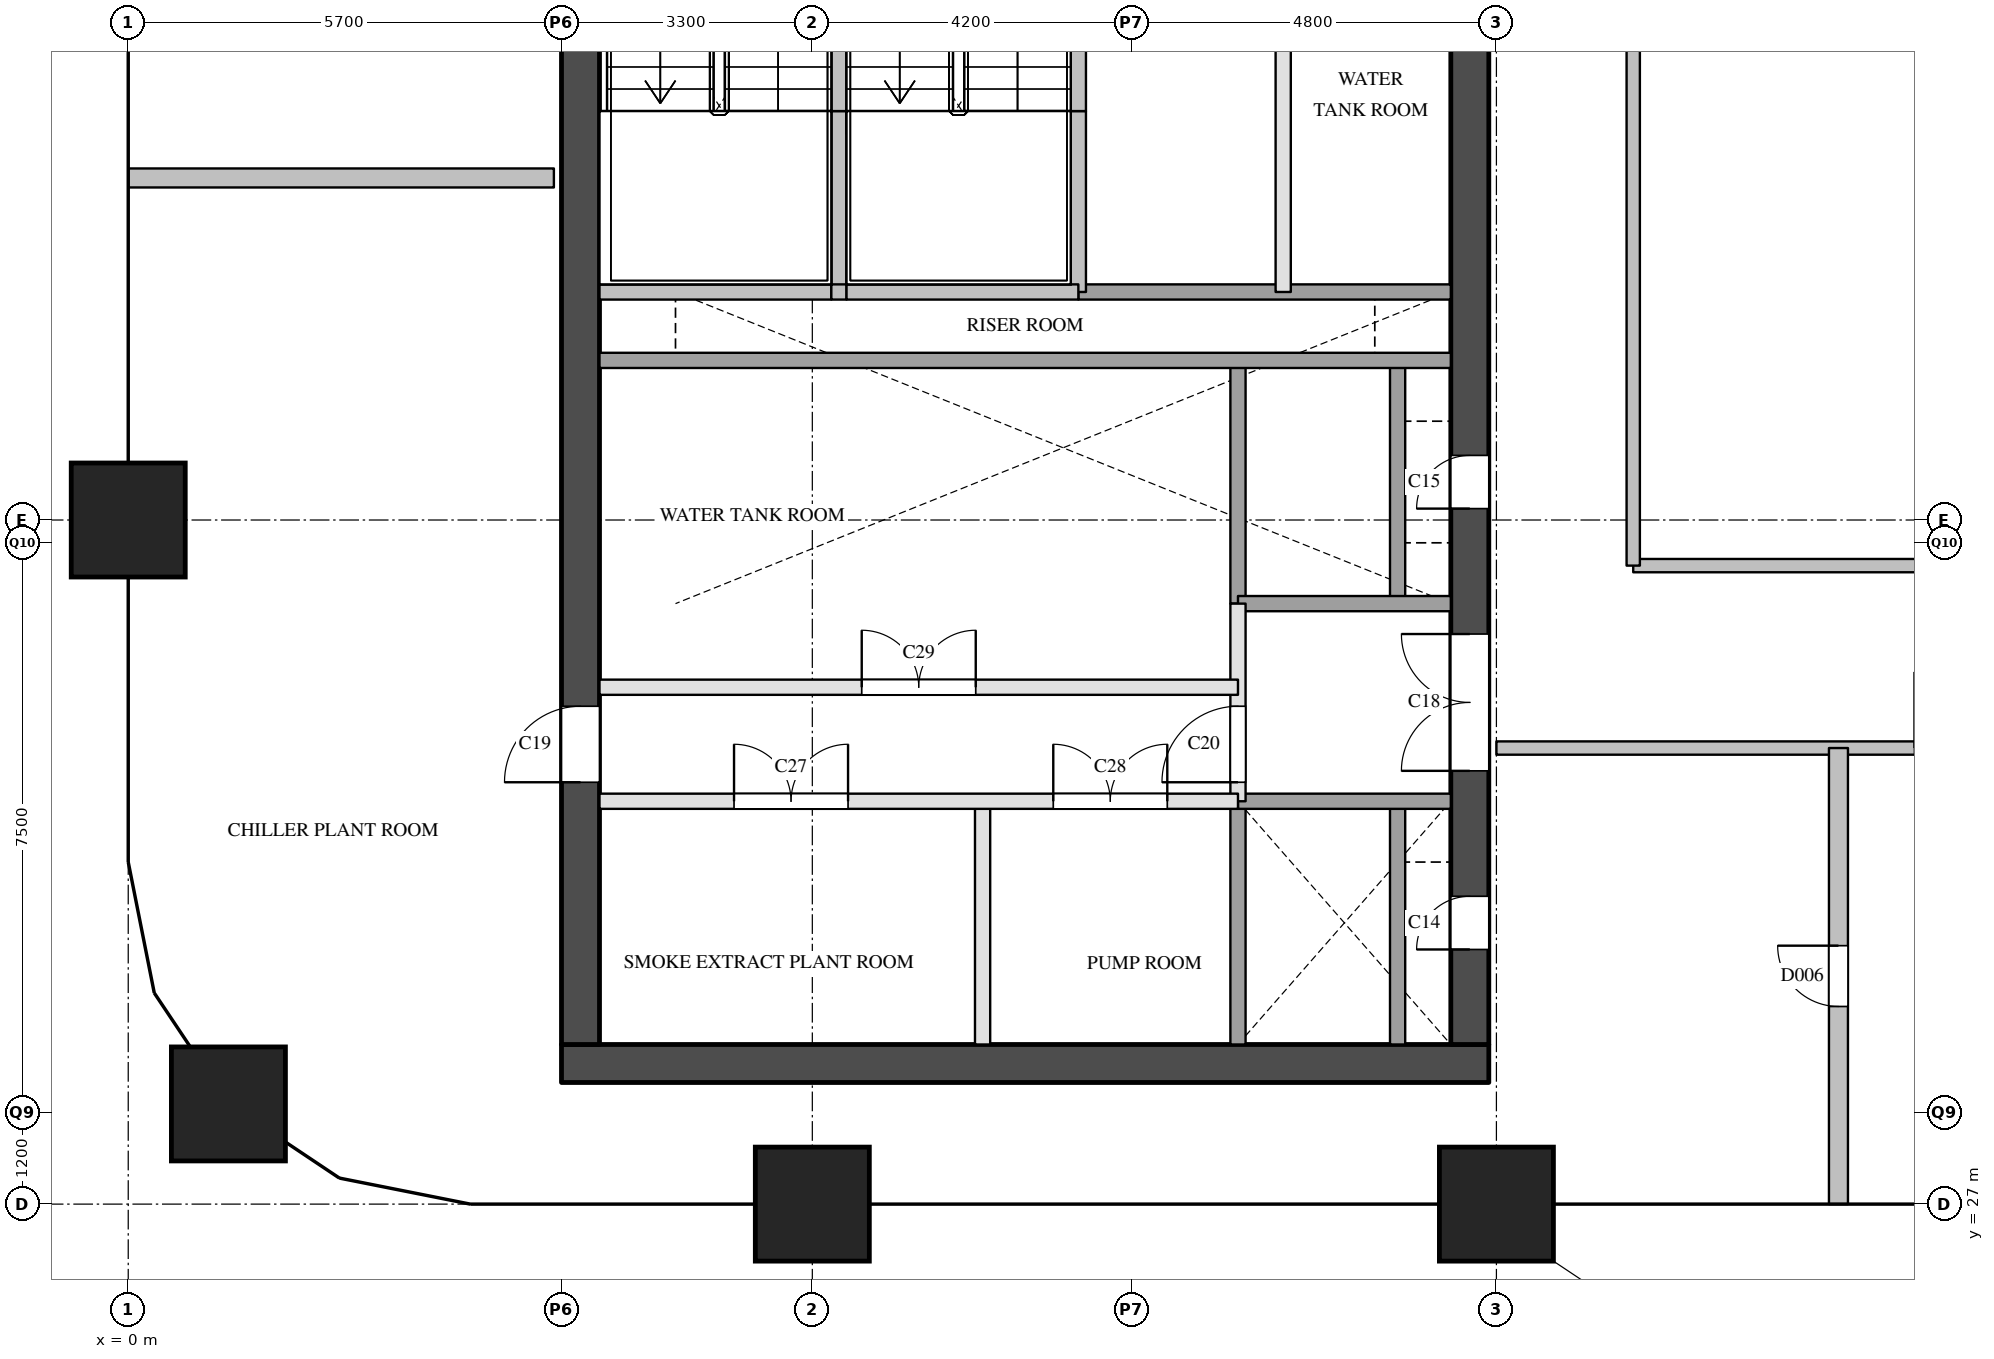
"""IFC4 building model, lengths in metres.
Left out: names, types, materials, properties, quantities, classifications, styles, units other than length and angle.
Written with IfcOpenShell. Run it as: python <this file> out.ifc"""

import sys

from ifc_helpers import new_model, si_unit, direction, frame, frame_2d, origin, origin_2d, place, context, subcontext, project, spatial, rectangle, extrude, element, fill, save


model = new_model("IFC4")
c1 = context("Model", 3, precision=1e-05, world=origin(), true_north=direction((0.0, 1.0)))
c2 = subcontext(c1, "Body", "Model", "MODEL_VIEW")
j1 = project(units=[si_unit("LENGTHUNIT", "METRE"), si_unit("PLANEANGLEUNIT", "RADIAN")], contexts=[c1])
p1 = place(None, origin())
s1 = spatial("IfcSite", under=j1, at=p1, CompositionType="ELEMENT")
p2 = place(p1, origin())
s2 = spatial("IfcBuilding", under=s1, at=p2, CompositionType="ELEMENT")
p3 = place(p2, frame((0.0, 0.0, 197.3)))
s3 = spatial("IfcBuildingStorey", under=s2, at=p3, CompositionType="ELEMENT", Elevation=197.3)
for number, where, z_axis, x_axis in (
    (1, (1.318, 28.318, 0.0), (0.0, 0.0, 1.0), (1.0, 0.0, 0.0)),
    (2, (0.0, 36.0, 0.0), (0.0, 0.0, 1.0), (1.0, 0.0, 0.0)),
    (3, (9.0, 27.0, 0.0), (0.0, 0.0, 1.0), (1.0, 0.0, 0.0)),
    (4, (18.0, 27.0, 0.0), (0.0, 0.0, 1.0), (1.0, 0.0, 0.0)),
):
    element("IfcColumn", number, at=place(p3, frame(where, z_axis=z_axis, x_axis=x_axis)), inside=s3, PredefinedType="COLUMN", context=c2, shape_type="SweptSolid", body=[
        extrude(rectangle(XDim=1.5, YDim=1.5, at=origin_2d()), origin(), (0.0, 0.0, 1.0), 6.0),
    ])
p4 = place(p3, frame((5.7, 28.85, 0.0), z_axis=(0.0, 0.0, 1.0), x_axis=(1.0, 0.0, 0.0)))
e5 = element("IfcWall", 5, at=p4, inside=s3, PredefinedType="SHEAR", context=c2, shape_type="SweptSolid", body=[
    extrude(rectangle(XDim=12.2, YDim=0.5, at=frame_2d((6.1, 0.0))), origin(), (0.0, 0.0, 1.0), 5.7),
])
p5 = place(p3, frame((5.95, 29.1, 0.0), z_axis=(0.0, 0.0, 1.0), x_axis=(0.0, 1.0, 0.0)))
e6 = element("IfcWall", 6, at=p5, inside=s3, PredefinedType="SHEAR", context=c2, shape_type="SweptSolid", body=[
    extrude(rectangle(XDim=20.3, YDim=0.5, at=frame_2d((10.15, 0.0))), origin(), (0.0, 0.0, 1.0), 5.7),
])
p6 = place(p5, frame((3.45, 0.0, 0.0)))
e7 = element("IfcOpeningElement", 7, at=p6, cuts=e6, PredefinedType="OPENING", context=c2, shape_type="SweptSolid", body=[
    extrude(rectangle(XDim=1.0, YDim=2.1, at=frame_2d((0.5, 1.05))), frame((0.0, 0.26, 0.0), z_axis=(0.0, -1.0, 0.0), x_axis=(1.0, 0.0, 0.0)), (0.0, 0.0, 1.0), 0.52),
])
p7 = place(p3, frame((17.65, 29.1, 0.0), z_axis=(0.0, 0.0, 1.0), x_axis=(0.0, 1.0, 0.0)))
e8 = element("IfcWall", 8, at=p7, inside=s3, PredefinedType="SHEAR", context=c2, shape_type="SweptSolid", body=[
    extrude(rectangle(XDim=20.3, YDim=0.5, at=frame_2d((10.15, 0.0))), origin(), (0.0, 0.0, 1.0), 5.7),
])
p8 = place(p7, frame((1.25, 0.0, 0.0)))
e9 = element("IfcOpeningElement", 9, at=p8, cuts=e8, PredefinedType="OPENING", context=c2, shape_type="SweptSolid", body=[
    extrude(rectangle(XDim=0.7, YDim=2.1, at=frame_2d((0.35, 1.05))), frame((0.0, 0.26, 0.0), z_axis=(0.0, -1.0, 0.0), x_axis=(1.0, 0.0, 0.0)), (0.0, 0.0, 1.0), 0.52),
])
p9 = place(p7, frame((7.05, 0.0, 0.0)))
e10 = element("IfcOpeningElement", 10, at=p9, cuts=e8, PredefinedType="OPENING", context=c2, shape_type="SweptSolid", body=[
    extrude(rectangle(XDim=0.7, YDim=2.1, at=frame_2d((0.35, 1.05))), frame((0.0, 0.26, 0.0), z_axis=(0.0, -1.0, 0.0), x_axis=(1.0, 0.0, 0.0)), (0.0, 0.0, 1.0), 0.52),
])
p10 = place(p7, frame((3.6, 0.0, 0.0)))
e11 = element("IfcOpeningElement", 11, at=p10, cuts=e8, PredefinedType="OPENING", context=c2, shape_type="SweptSolid", body=[
    extrude(rectangle(XDim=1.8, YDim=2.1, at=frame_2d((0.9, 1.05))), frame((0.0, 0.26, 0.0), z_axis=(0.0, -1.0, 0.0), x_axis=(1.0, 0.0, 0.0)), (0.0, 0.0, 1.0), 0.52),
])
p11 = place(p7, frame((16.4, 0.0, 0.0)))
e12 = element("IfcOpeningElement", 12, at=p11, cuts=e8, PredefinedType="OPENING", context=c2, shape_type="SweptSolid", body=[
    extrude(rectangle(XDim=1.0, YDim=2.1, at=frame_2d((0.5, 1.05))), frame((0.0, 0.26, 0.0), z_axis=(0.0, -1.0, 0.0), x_axis=(1.0, 0.0, 0.0)), (0.0, 0.0, 1.0), 0.52),
])
p12 = place(p3, frame((9.35, 39.0, 0.0), z_axis=(0.0, 0.0, 1.0), x_axis=(0.0, 1.0, 0.0)))
e13 = element("IfcWall", 13, at=p12, inside=s3, PredefinedType="SOLIDWALL", context=c2, shape_type="SweptSolid", body=[
    extrude(rectangle(XDim=2.38, YDim=0.2, at=frame_2d((1.19, 0.0))), origin(), (0.0, 0.0, 1.0), 5.7),
])
p13 = place(p3, frame((9.35, 41.38, 0.0), z_axis=(0.0, 0.0, 1.0), x_axis=(0.0, 1.0, 0.0)))
e14 = element("IfcWall", 14, at=p13, inside=s3, PredefinedType="SOLIDWALL", context=c2, shape_type="SweptSolid", body=[
    extrude(rectangle(XDim=2.32, YDim=0.2, at=frame_2d((1.16, 0.0))), origin(), (0.0, 0.0, 1.0), 5.7),
])
p14 = place(p3, frame((11.24, 29.1, 0.0), z_axis=(0.0, 0.0, 1.0), x_axis=(0.0, 1.0, 0.0)))
e15 = element("IfcWall", 15, at=p14, inside=s3, PredefinedType="PARTITIONING", context=c2, shape_type="SweptSolid", body=[
    extrude(rectangle(XDim=3.2, YDim=0.2, at=frame_2d((1.6, 0.0))), origin(), (0.0, 0.0, 1.0), 5.7),
])
p15 = place(p3, frame((12.5, 39.0, 0.0), z_axis=(0.0, 0.0, 1.0), x_axis=(0.0, 1.0, 0.0)))
e16 = element("IfcWall", 16, at=p15, inside=s3, PredefinedType="SOLIDWALL", context=c2, shape_type="SweptSolid", body=[
    extrude(rectangle(XDim=2.38, YDim=0.2, at=frame_2d((1.19, 0.0))), origin(), (0.0, 0.0, 1.0), 5.7),
])
p16 = place(p3, frame((12.5, 41.38, 0.0), z_axis=(0.0, 0.0, 1.0), x_axis=(0.0, 1.0, 0.0)))
e17 = element("IfcWall", 17, at=p16, inside=s3, PredefinedType="SOLIDWALL", context=c2, shape_type="SweptSolid", body=[
    extrude(rectangle(XDim=2.32, YDim=0.2, at=frame_2d((1.16, 0.0))), origin(), (0.0, 0.0, 1.0), 5.7),
])
p17 = place(p3, frame((14.6, 32.3, 0.0), z_axis=(0.0, 0.0, 1.0), x_axis=(0.0, 1.0, 0.0)))
e18 = element("IfcWall", 18, at=p17, inside=s3, PredefinedType="PARTITIONING", context=c2, shape_type="SweptSolid", body=[
    extrude(rectangle(XDim=2.6, YDim=0.2, at=frame_2d((1.3, 0.0))), origin(), (0.0, 0.0, 1.0), 5.7),
])
p18 = place(p17, frame((0.25, 0.0, 0.0)))
e19 = element("IfcOpeningElement", 19, at=p18, cuts=e18, PredefinedType="OPENING", context=c2, shape_type="SweptSolid", body=[
    extrude(rectangle(XDim=1.0, YDim=2.1, at=frame_2d((0.5, 1.05))), frame((0.0, 0.11, 0.0), z_axis=(0.0, -1.0, 0.0), x_axis=(1.0, 0.0, 0.0)), (0.0, 0.0, 1.0), 0.22),
])
p19 = place(p3, frame((14.6, 29.1, 0.0), z_axis=(0.0, 0.0, 1.0), x_axis=(0.0, 1.0, 0.0)))
e20 = element("IfcWall", 20, at=p19, inside=s3, PredefinedType="SOLIDWALL", context=c2, shape_type="SweptSolid", body=[
    extrude(rectangle(XDim=3.2, YDim=0.2, at=frame_2d((1.6, 0.0))), origin(), (0.0, 0.0, 1.0), 5.7),
])
p20 = place(p3, frame((14.6, 34.9, 0.0), z_axis=(0.0, 0.0, 1.0), x_axis=(0.0, 1.0, 0.0)))
e21 = element("IfcWall", 21, at=p20, inside=s3, PredefinedType="SOLIDWALL", context=c2, shape_type="SweptSolid", body=[
    extrude(rectangle(XDim=3.2, YDim=0.2, at=frame_2d((1.6, 0.0))), origin(), (0.0, 0.0, 1.0), 5.7),
])
p21 = place(p3, frame((15.195, 39.0, 0.0), z_axis=(0.0, 0.0, 1.0), x_axis=(0.0, 1.0, 0.0)))
e22 = element("IfcWall", 22, at=p21, inside=s3, PredefinedType="PARTITIONING", context=c2, shape_type="SweptSolid", body=[
    extrude(rectangle(XDim=6.2, YDim=0.2, at=frame_2d((3.1, 0.0))), origin(), (0.0, 0.0, 1.0), 5.7),
])
p22 = place(p3, frame((16.7, 29.1, 0.0), z_axis=(0.0, 0.0, 1.0), x_axis=(0.0, 1.0, 0.0)))
e23 = element("IfcWall", 23, at=p22, inside=s3, PredefinedType="SOLIDWALL", context=c2, shape_type="SweptSolid", body=[
    extrude(rectangle(XDim=3.2, YDim=0.2, at=frame_2d((1.6, 0.0))), origin(), (0.0, 0.0, 1.0), 5.7),
])
p23 = place(p3, frame((16.7, 34.9, 0.0), z_axis=(0.0, 0.0, 1.0), x_axis=(0.0, 1.0, 0.0)))
e24 = element("IfcWall", 24, at=p23, inside=s3, PredefinedType="SOLIDWALL", context=c2, shape_type="SweptSolid", body=[
    extrude(rectangle(XDim=3.2, YDim=0.2, at=frame_2d((1.6, 0.0))), origin(), (0.0, 0.0, 1.0), 5.7),
])
p24 = place(p3, frame((6.2, 32.3, 0.0), z_axis=(0.0, 0.0, 1.0), x_axis=(1.0, 0.0, 0.0)))
e25 = element("IfcWall", 25, at=p24, inside=s3, PredefinedType="PARTITIONING", context=c2, shape_type="SweptSolid", body=[
    extrude(rectangle(XDim=8.4, YDim=0.2, at=frame_2d((4.2, 0.0))), origin(), (0.0, 0.0, 1.0), 5.7),
])
p25 = place(p24, frame((1.77, 0.0, 0.0)))
e26 = element("IfcOpeningElement", 26, at=p25, cuts=e25, PredefinedType="OPENING", context=c2, shape_type="SweptSolid", body=[
    extrude(rectangle(XDim=1.5, YDim=2.1, at=frame_2d((0.75, 1.05))), frame((0.0, 0.11, 0.0), z_axis=(0.0, -1.0, 0.0), x_axis=(1.0, 0.0, 0.0)), (0.0, 0.0, 1.0), 0.22),
])
p26 = place(p24, frame((5.97, 0.0, 0.0)))
e27 = element("IfcOpeningElement", 27, at=p26, cuts=e25, PredefinedType="OPENING", context=c2, shape_type="SweptSolid", body=[
    extrude(rectangle(XDim=1.5, YDim=2.1, at=frame_2d((0.75, 1.05))), frame((0.0, 0.11, 0.0), z_axis=(0.0, -1.0, 0.0), x_axis=(1.0, 0.0, 0.0)), (0.0, 0.0, 1.0), 0.22),
])
p27 = place(p3, frame((14.6, 32.3, 0.0), z_axis=(0.0, 0.0, 1.0), x_axis=(1.0, 0.0, 0.0)))
e28 = element("IfcWall", 28, at=p27, inside=s3, PredefinedType="SOLIDWALL", context=c2, shape_type="SweptSolid", body=[
    extrude(rectangle(XDim=2.8, YDim=0.2, at=frame_2d((1.4, 0.0))), origin(), (0.0, 0.0, 1.0), 5.7),
])
p28 = place(p3, frame((6.2, 33.8, 0.0), z_axis=(0.0, 0.0, 1.0), x_axis=(1.0, 0.0, 0.0)))
e29 = element("IfcWall", 29, at=p28, inside=s3, PredefinedType="PARTITIONING", context=c2, shape_type="SweptSolid", body=[
    extrude(rectangle(XDim=8.4, YDim=0.2, at=frame_2d((4.2, 0.0))), origin(), (0.0, 0.0, 1.0), 5.7),
])
p29 = place(p28, frame((3.45, 0.0, 0.0)))
e30 = element("IfcOpeningElement", 30, at=p29, cuts=e29, PredefinedType="OPENING", context=c2, shape_type="SweptSolid", body=[
    extrude(rectangle(XDim=1.5, YDim=2.1, at=frame_2d((0.75, 1.05))), frame((0.0, 0.11, 0.0), z_axis=(0.0, -1.0, 0.0), x_axis=(1.0, 0.0, 0.0)), (0.0, 0.0, 1.0), 0.22),
])
p30 = place(p3, frame((14.6, 34.9, 0.0), z_axis=(0.0, 0.0, 1.0), x_axis=(1.0, 0.0, 0.0)))
e31 = element("IfcWall", 31, at=p30, inside=s3, PredefinedType="SOLIDWALL", context=c2, shape_type="SweptSolid", body=[
    extrude(rectangle(XDim=2.8, YDim=0.2, at=frame_2d((1.4, 0.0))), origin(), (0.0, 0.0, 1.0), 5.7),
])
p31 = place(p3, frame((6.2, 38.1, 0.0), z_axis=(0.0, 0.0, 1.0), x_axis=(1.0, 0.0, 0.0)))
e32 = element("IfcWall", 32, at=p31, inside=s3, PredefinedType="SOLIDWALL", context=c2, shape_type="SweptSolid", body=[
    extrude(rectangle(XDim=11.2, YDim=0.2, at=frame_2d((5.6, 0.0))), origin(), (0.0, 0.0, 1.0), 5.7),
])
p32 = place(p3, frame((12.5, 39.0, 0.0), z_axis=(0.0, 0.0, 1.0), x_axis=(1.0, 0.0, 0.0)))
e33 = element("IfcWall", 33, at=p32, inside=s3, PredefinedType="SOLIDWALL", context=c2, shape_type="SweptSolid", body=[
    extrude(rectangle(XDim=4.9, YDim=0.2, at=frame_2d((2.45, 0.0))), origin(), (0.0, 0.0, 1.0), 5.7),
])
p33 = place(p3, frame((6.2, 39.0, 0.0), z_axis=(0.0, 0.0, 1.0), x_axis=(1.0, 0.0, 0.0)))
e34 = element("IfcWall", 34, at=p33, inside=s3, PredefinedType="SOLIDWALL", context=c2, shape_type="SweptSolid", body=[
    extrude(rectangle(XDim=3.05, YDim=0.2, at=frame_2d((1.525, 0.0))), origin(), (0.0, 0.0, 1.0), 5.7),
])
p34 = place(p3, frame((9.25, 39.0, 0.0), z_axis=(0.0, 0.0, 1.0), x_axis=(1.0, 0.0, 0.0)))
e35 = element("IfcWall", 35, at=p34, inside=s3, PredefinedType="SOLIDWALL", context=c2, shape_type="SweptSolid", body=[
    extrude(rectangle(XDim=0.2, YDim=0.2, at=frame_2d((0.1, 0.0))), origin(), (0.0, 0.0, 1.0), 5.7),
])
p35 = place(p3, frame((9.45, 39.0, 0.0), z_axis=(0.0, 0.0, 1.0), x_axis=(1.0, 0.0, 0.0)))
e36 = element("IfcWall", 36, at=p35, inside=s3, PredefinedType="SOLIDWALL", context=c2, shape_type="SweptSolid", body=[
    extrude(rectangle(XDim=3.05, YDim=0.2, at=frame_2d((1.525, 0.0))), origin(), (0.0, 0.0, 1.0), 5.7),
])
p36 = place(p3, frame((18.0, 33.0, 0.0), z_axis=(0.0, 0.0, 1.0), x_axis=(1.0, 0.0, 0.0)))
e37 = element("IfcWall", 37, at=p36, inside=s3, PredefinedType="PARTITIONING", context=c2, shape_type="SweptSolid", body=[
    extrude(rectangle(XDim=18.0, YDim=0.175, at=frame_2d((9.0, 0.0))), origin(), (0.0, 0.0, 1.0), 5.7),
])
p37 = place(p36, frame((5.5, 0.0, 0.0)))
e38 = element("IfcOpeningElement", 38, at=p37, cuts=e37, PredefinedType="OPENING", context=c2, shape_type="SweptSolid", body=[
    extrude(rectangle(XDim=1.0, YDim=2.1, at=frame_2d((0.5, 1.05))), frame((0.0, 0.097, 0.0), z_axis=(0.0, -1.0, 0.0), x_axis=(1.0, 0.0, 0.0)), (0.0, 0.0, 1.0), 0.195),
])
p38 = place(p36, frame((11.5, 0.0, 0.0)))
e39 = element("IfcOpeningElement", 39, at=p38, cuts=e37, PredefinedType="OPENING", context=c2, shape_type="SweptSolid", body=[
    extrude(rectangle(XDim=1.0, YDim=2.1, at=frame_2d((0.5, 1.05))), frame((0.0, 0.097, 0.0), z_axis=(0.0, -1.0, 0.0), x_axis=(1.0, 0.0, 0.0)), (0.0, 0.0, 1.0), 0.195),
])
p39 = place(p3, frame((19.8, 35.4, 0.0), z_axis=(0.0, 0.0, 1.0), x_axis=(1.0, 0.0, 0.0)))
e40 = element("IfcWall", 40, at=p39, inside=s3, PredefinedType="PARTITIONING", context=c2, shape_type="SweptSolid", body=[
    extrude(rectangle(XDim=14.4, YDim=0.175, at=frame_2d((7.2, 0.0))), origin(), (0.0, 0.0, 1.0), 5.7),
])
p40 = place(p39, frame((4.12, 0.0, 0.0)))
e41 = element("IfcOpeningElement", 41, at=p40, cuts=e40, PredefinedType="OPENING", context=c2, shape_type="SweptSolid", body=[
    extrude(rectangle(XDim=1.0, YDim=2.1, at=frame_2d((0.5, 1.05))), frame((0.0, 0.097, 0.0), z_axis=(0.0, -1.0, 0.0), x_axis=(1.0, 0.0, 0.0)), (0.0, 0.0, 1.0), 0.195),
])
p41 = place(p3, frame((19.8, 35.4, 0.0), z_axis=(0.0, 0.0, 1.0), x_axis=(0.0, 1.0, 0.0)))
e42 = element("IfcWall", 42, at=p41, inside=s3, PredefinedType="PARTITIONING", context=c2, shape_type="SweptSolid", body=[
    extrude(rectangle(XDim=10.2, YDim=0.175, at=frame_2d((5.1, 0.0))), origin(), (0.0, 0.0, 1.0), 4.59),
])
p42 = place(p3, frame((0.0, 40.5, 0.0), z_axis=(0.0, 0.0, 1.0), x_axis=(1.0, 0.0, 0.0)))
e43 = element("IfcWall", 43, at=p42, inside=s3, PredefinedType="PARTITIONING", context=c2, shape_type="SweptSolid", body=[
    extrude(rectangle(XDim=5.6, YDim=0.25, at=frame_2d((2.8, 0.0))), origin(), (0.0, 0.0, 1.0), 5.7),
])
p43 = place(p3, frame((22.5, 27.0, 0.0), z_axis=(0.0, 0.0, 1.0), x_axis=(0.0, 1.0, 0.0)))
e44 = element("IfcWall", 44, at=p43, inside=s3, PredefinedType="PARTITIONING", context=c2, shape_type="SweptSolid", body=[
    extrude(rectangle(XDim=6.0, YDim=0.25, at=frame_2d((3.0, 0.0))), origin(), (0.0, 0.0, 1.0), 5.7),
])
p44 = place(p43, frame((2.6, 0.0, 0.0)))
e45 = element("IfcOpeningElement", 45, at=p44, cuts=e44, PredefinedType="OPENING", context=c2, shape_type="SweptSolid", body=[
    extrude(rectangle(XDim=0.8, YDim=2.1, at=frame_2d((0.4, 1.05))), frame((0.0, 0.135, 0.0), z_axis=(0.0, -1.0, 0.0), x_axis=(1.0, 0.0, 0.0)), (0.0, 0.0, 1.0), 0.27),
])
p45 = place(p8, origin())
e46 = element("IfcDoor", 46, at=p45, inside=s3, OperationType="SINGLE_SWING_LEFT", PredefinedType="DOOR", context=c2, shape_type="SweptSolid", body=[
    extrude(rectangle(XDim=0.7, YDim=2.1, at=frame_2d((0.35, 1.05))), frame((0.0, 0.025, 0.0), z_axis=(0.0, -1.0, 0.0), x_axis=(1.0, 0.0, 0.0)), (0.0, 0.0, 1.0), 0.05),
])
fill(e9, e46)
p46 = place(p9, origin())
e47 = element("IfcDoor", 47, at=p46, inside=s3, OperationType="SINGLE_SWING_LEFT", PredefinedType="DOOR", context=c2, shape_type="SweptSolid", body=[
    extrude(rectangle(XDim=0.7, YDim=2.1, at=frame_2d((0.35, 1.05))), frame((0.0, 0.025, 0.0), z_axis=(0.0, -1.0, 0.0), x_axis=(1.0, 0.0, 0.0)), (0.0, 0.0, 1.0), 0.05),
])
fill(e10, e47)
p47 = place(p10, origin())
e48 = element("IfcDoor", 48, at=p47, inside=s3, OperationType="DOUBLE_DOOR_SINGLE_SWING", PredefinedType="DOOR", context=c2, shape_type="SweptSolid", body=[
    extrude(rectangle(XDim=1.8, YDim=2.1, at=frame_2d((0.9, 1.05))), frame((0.0, 0.025, 0.0), z_axis=(0.0, -1.0, 0.0), x_axis=(1.0, 0.0, 0.0)), (0.0, 0.0, 1.0), 0.05),
])
fill(e11, e48)
p48 = place(p6, origin())
e49 = element("IfcDoor", 49, at=p48, inside=s3, OperationType="SINGLE_SWING_LEFT", PredefinedType="DOOR", context=c2, shape_type="SweptSolid", body=[
    extrude(rectangle(XDim=1.0, YDim=2.1, at=frame_2d((0.5, 1.05))), frame((0.0, 0.025, 0.0), z_axis=(0.0, -1.0, 0.0), x_axis=(1.0, 0.0, 0.0)), (0.0, 0.0, 1.0), 0.05),
])
fill(e7, e49)
p49 = place(p18, origin())
e50 = element("IfcDoor", 50, at=p49, inside=s3, OperationType="SINGLE_SWING_LEFT", PredefinedType="DOOR", context=c2, shape_type="SweptSolid", body=[
    extrude(rectangle(XDim=1.0, YDim=2.1, at=frame_2d((0.5, 1.05))), frame((0.0, 0.025, 0.0), z_axis=(0.0, -1.0, 0.0), x_axis=(1.0, 0.0, 0.0)), (0.0, 0.0, 1.0), 0.05),
])
fill(e19, e50)
p50 = place(p25, origin())
e51 = element("IfcDoor", 51, at=p50, inside=s3, OperationType="DOUBLE_DOOR_SINGLE_SWING", PredefinedType="DOOR", context=c2, shape_type="SweptSolid", body=[
    extrude(rectangle(XDim=1.5, YDim=2.1, at=frame_2d((0.75, 1.05))), frame((0.0, 0.025, 0.0), z_axis=(0.0, -1.0, 0.0), x_axis=(1.0, 0.0, 0.0)), (0.0, 0.0, 1.0), 0.05),
])
fill(e26, e51)
p51 = place(p26, origin())
e52 = element("IfcDoor", 52, at=p51, inside=s3, OperationType="DOUBLE_DOOR_SINGLE_SWING", PredefinedType="DOOR", context=c2, shape_type="SweptSolid", body=[
    extrude(rectangle(XDim=1.5, YDim=2.1, at=frame_2d((0.75, 1.05))), frame((0.0, 0.025, 0.0), z_axis=(0.0, -1.0, 0.0), x_axis=(1.0, 0.0, 0.0)), (0.0, 0.0, 1.0), 0.05),
])
fill(e27, e52)
p52 = place(p29, origin())
e53 = element("IfcDoor", 53, at=p52, inside=s3, OperationType="DOUBLE_DOOR_SINGLE_SWING", PredefinedType="DOOR", context=c2, shape_type="SweptSolid", body=[
    extrude(rectangle(XDim=1.5, YDim=2.1, at=frame_2d((0.75, 1.05))), frame((0.0, 0.025, 0.0), z_axis=(0.0, -1.0, 0.0), x_axis=(1.0, 0.0, 0.0)), (0.0, 0.0, 1.0), 0.05),
])
fill(e30, e53)
p53 = place(p44, origin())
e54 = element("IfcDoor", 54, at=p53, inside=s3, OperationType="SINGLE_SWING_RIGHT", PredefinedType="DOOR", context=c2, shape_type="SweptSolid", body=[
    extrude(rectangle(XDim=0.8, YDim=2.1, at=frame_2d((0.4, 1.05))), frame((0.0, 0.025, 0.0), z_axis=(0.0, -1.0, 0.0), x_axis=(1.0, 0.0, 0.0)), (0.0, 0.0, 1.0), 0.05),
])
fill(e45, e54)
save(model, sys.argv[1])
